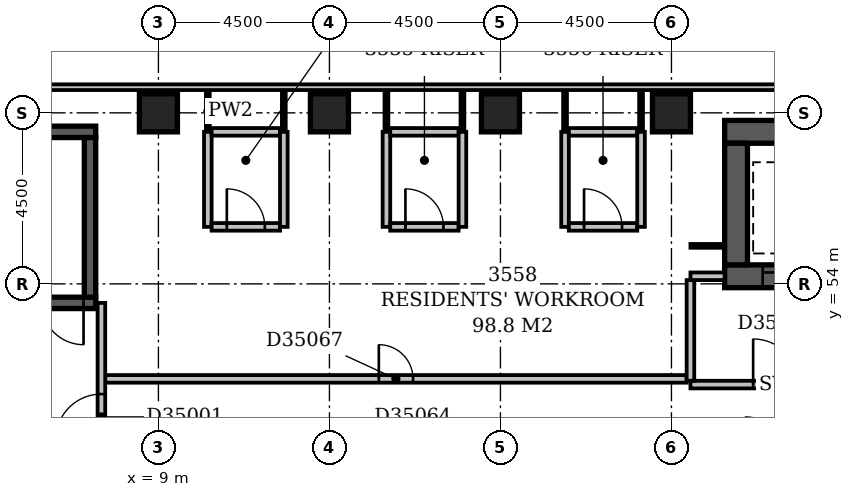
"""IFC4 building model, lengths in metres.
Left out: names, types, materials, properties, quantities, classifications, styles, units other than length and angle.
Written with IfcOpenShell. Run it as: python <this file> out.ifc"""

import sys

from ifc_helpers import new_model, si_unit, direction, frame, frame_2d, origin, origin_2d, place, context, subcontext, project, spatial, rectangle, extrude, element, fill, save


model = new_model("IFC4")
c1 = context("Model", 3, precision=1e-05, world=origin(), true_north=direction((0.0, 1.0)))
c2 = subcontext(c1, "Body", "Model", "MODEL_VIEW")
j1 = project(units=[si_unit("LENGTHUNIT", "METRE"), si_unit("PLANEANGLEUNIT", "RADIAN")], contexts=[c1])
p1 = place(None, origin())
s1 = spatial("IfcSite", under=j1, at=p1, CompositionType="ELEMENT")
p2 = place(p1, origin())
s2 = spatial("IfcBuilding", under=s1, at=p2, CompositionType="ELEMENT")
p3 = place(p2, frame((0.0, 0.0, 141.2)))
s3 = spatial("IfcBuildingStorey", under=s2, at=p3, CompositionType="ELEMENT", Elevation=141.2)
p4 = place(p3, frame((0.35, 53.5, -0.3), z_axis=(0.0, 0.0, 1.0), x_axis=(1.0, 0.0, 0.0)))
e1 = element("IfcWall", 1, at=p4, inside=s3, PredefinedType="SHEAR", context=c2, shape_type="SweptSolid", body=[
    extrude(rectangle(XDim=7.0, YDim=0.3, at=frame_2d((3.5, 0.0))), origin(), (0.0, 0.0, 1.0), 3.6),
])
p5 = place(p4, frame((5.58, 0.0, 0.3)))
e2 = element("IfcOpeningElement", 2, at=p5, cuts=e1, PredefinedType="OPENING", context=c2, shape_type="SweptSolid", body=[
    extrude(rectangle(XDim=1.1, YDim=2.1, at=frame_2d((0.55, 1.05))), frame((0.0, 0.162, 0.0), z_axis=(0.0, -1.0, 0.0), x_axis=(1.0, 0.0, 0.0)), (0.0, 0.0, 1.0), 0.324),
])
p6 = place(p3, frame((0.35, 58.0, -0.3), z_axis=(0.0, 0.0, 1.0), x_axis=(1.0, 0.0, 0.0)))
e3 = element("IfcWall", 3, at=p6, inside=s3, PredefinedType="SHEAR", context=c2, shape_type="SweptSolid", body=[
    extrude(rectangle(XDim=7.0, YDim=0.3, at=frame_2d((3.5, 0.0))), origin(), (0.0, 0.0, 1.0), 3.6),
])
p7 = place(p3, frame((7.2, 53.65, -0.3), z_axis=(0.0, 0.0, 1.0), x_axis=(0.0, 1.0, 0.0)))
e4 = element("IfcWall", 4, at=p7, inside=s3, PredefinedType="SHEAR", context=c2, shape_type="SweptSolid", body=[
    extrude(rectangle(XDim=4.2, YDim=0.3, at=frame_2d((2.1, 0.0))), origin(), (0.0, 0.0, 1.0), 3.6),
])
p8 = place(p3, frame((23.9, 54.2, -0.3), z_axis=(0.0, 0.0, 1.0), x_axis=(1.0, 0.0, 0.0)))
e5 = element("IfcWall", 5, at=p8, inside=s3, PredefinedType="SHEAR", context=c2, shape_type="SweptSolid", body=[
    extrude(rectangle(XDim=3.1, YDim=0.6, at=frame_2d((1.55, 0.0))), origin(), (0.0, 0.0, 1.0), 3.6),
])
p9 = place(p8, frame((1.0, 0.0, 0.3)))
e6 = element("IfcOpeningElement", 6, at=p9, cuts=e5, PredefinedType="OPENING", context=c2, shape_type="SweptSolid", body=[
    extrude(rectangle(XDim=1.1, YDim=2.1, at=frame_2d((0.55, 1.05))), frame((0.0, 0.312, 0.0), z_axis=(0.0, -1.0, 0.0), x_axis=(1.0, 0.0, 0.0)), (0.0, 0.0, 1.0), 0.624),
])
p10 = place(p3, frame((23.9, 58.0, -0.3), z_axis=(0.0, 0.0, 1.0), x_axis=(1.0, 0.0, 0.0)))
e7 = element("IfcWall", 7, at=p10, inside=s3, PredefinedType="SHEAR", context=c2, shape_type="SweptSolid", body=[
    extrude(rectangle(XDim=3.1, YDim=0.6, at=frame_2d((1.55, 0.0))), origin(), (0.0, 0.0, 1.0), 3.6),
])
p11 = place(p3, frame((24.2, 54.5, -0.3), z_axis=(0.0, 0.0, 1.0), x_axis=(0.0, 1.0, 0.0)))
e8 = element("IfcWall", 8, at=p11, inside=s3, PredefinedType="SHEAR", context=c2, shape_type="SweptSolid", body=[
    extrude(rectangle(XDim=3.2, YDim=0.6, at=frame_2d((1.6, 0.0))), origin(), (0.0, 0.0, 1.0), 3.6),
])
for number, where, z_axis, x_axis in (
    (9, (9.0, 58.5, -0.3), (0.0, 0.0, 1.0), (1.0, 0.0, 0.0)),
    (10, (13.5, 58.5, -0.3), (0.0, 0.0, 1.0), (1.0, 0.0, 0.0)),
    (11, (18.0, 58.5, -0.3), (0.0, 0.0, 1.0), (1.0, 0.0, 0.0)),
    (12, (22.5, 58.5, -0.3), (0.0, 0.0, 1.0), (1.0, 0.0, 0.0)),
):
    element("IfcColumn", number, at=place(p3, frame(where, z_axis=z_axis, x_axis=x_axis)), inside=s3, PredefinedType="COLUMN", context=c2, shape_type="SweptSolid", body=[
        extrude(rectangle(XDim=1.0, YDim=1.0, at=origin_2d()), origin(), (0.0, 0.0, 1.0), 3.6),
    ])
p12 = place(p3, frame((68.1, 59.175, 0.0), z_axis=(0.0, 0.0, 1.0), x_axis=(-1.0, 0.0, 0.0)))
e13 = element("IfcWall", 13, at=p12, inside=s3, PredefinedType="STANDARD", context=c2, shape_type="SweptSolid", body=[
    extrude(rectangle(XDim=68.85, YDim=0.15, at=frame_2d((34.425, 0.0))), origin(), (0.0, 0.0, 1.0), 2.7),
])
p13 = place(p12, frame((15.15, 0.0, 0.6)))
e14 = element("IfcOpeningElement", 14, at=p13, cuts=e13, PredefinedType="OPENING", context=c2, shape_type="SweptSolid", body=[
    extrude(rectangle(XDim=2.4, YDim=1.8, at=frame_2d((1.2, 0.9))), frame((0.0, 0.087, 0.0), z_axis=(0.0, -1.0, 0.0), x_axis=(1.0, 0.0, 0.0)), (0.0, 0.0, 1.0), 0.174),
])
p14 = place(p12, frame((19.65, 0.0, 0.6)))
e15 = element("IfcOpeningElement", 15, at=p14, cuts=e13, PredefinedType="OPENING", context=c2, shape_type="SweptSolid", body=[
    extrude(rectangle(XDim=2.4, YDim=1.8, at=frame_2d((1.2, 0.9))), frame((0.0, 0.087, 0.0), z_axis=(0.0, -1.0, 0.0), x_axis=(1.0, 0.0, 0.0)), (0.0, 0.0, 1.0), 0.174),
])
p15 = place(p12, frame((37.65, 0.0, 0.6)))
e16 = element("IfcOpeningElement", 16, at=p15, cuts=e13, PredefinedType="OPENING", context=c2, shape_type="SweptSolid", body=[
    extrude(rectangle(XDim=2.4, YDim=1.8, at=frame_2d((1.2, 0.9))), frame((0.0, 0.087, 0.0), z_axis=(0.0, -1.0, 0.0), x_axis=(1.0, 0.0, 0.0)), (0.0, 0.0, 1.0), 0.174),
])
p16 = place(p3, frame((23.0, 51.35, 0.0), z_axis=(0.0, 0.0, 1.0), x_axis=(1.0, 0.0, 0.0)))
e17 = element("IfcWall", 17, at=p16, inside=s3, PredefinedType="PARTITIONING", context=c2, shape_type="SweptSolid", body=[
    extrude(rectangle(XDim=4.8, YDim=0.2, at=frame_2d((2.4, 0.0))), origin(), (0.0, 0.0, 1.0), 3.3),
])
p17 = place(p16, frame((1.65, 0.0, 0.0)))
e18 = element("IfcOpeningElement", 18, at=p17, cuts=e17, PredefinedType="OPENING", context=c2, shape_type="SweptSolid", body=[
    extrude(rectangle(XDim=1.2, YDim=2.1, at=frame_2d((0.6, 1.05))), frame((0.0, 0.112, 0.0), z_axis=(0.0, -1.0, 0.0), x_axis=(1.0, 0.0, 0.0)), (0.0, 0.0, 1.0), 0.224),
])
p18 = place(p3, frame((23.0, 54.2, 0.0), z_axis=(0.0, 0.0, 1.0), x_axis=(1.0, 0.0, 0.0)))
e19 = element("IfcWall", 19, at=p18, inside=s3, PredefinedType="PARTITIONING", context=c2, shape_type="SweptSolid", body=[
    extrude(rectangle(XDim=0.9, YDim=0.2, at=frame_2d((0.45, 0.0))), origin(), (0.0, 0.0, 1.0), 3.3),
])
p19 = place(p3, frame((23.0, 51.45, 0.0), z_axis=(0.0, 0.0, 1.0), x_axis=(0.0, 1.0, 0.0)))
e20 = element("IfcWall", 20, at=p19, inside=s3, PredefinedType="PARTITIONING", context=c2, shape_type="SweptSolid", body=[
    extrude(rectangle(XDim=2.65, YDim=0.2, at=frame_2d((1.325, 0.0))), origin(), (0.0, 0.0, 1.0), 3.3),
])
p20 = place(p3, frame((7.5, 49.6, 0.0), z_axis=(0.0, 0.0, 1.0), x_axis=(0.0, 1.0, 0.0)))
e21 = element("IfcWall", 21, at=p20, inside=s3, PredefinedType="PARTITIONING", context=c2, shape_type="SweptSolid", body=[
    extrude(rectangle(XDim=3.9, YDim=0.2, at=frame_2d((1.95, 0.0))), origin(), (0.0, 0.0, 1.0), 3.3),
])
p21 = place(p20, frame((0.3, 0.0, 0.0)))
e22 = element("IfcOpeningElement", 22, at=p21, cuts=e21, PredefinedType="OPENING", context=c2, shape_type="SweptSolid", body=[
    extrude(rectangle(XDim=1.2, YDim=2.1, at=frame_2d((0.6, 1.05))), frame((0.0, 0.112, 0.0), z_axis=(0.0, -1.0, 0.0), x_axis=(1.0, 0.0, 0.0)), (0.0, 0.0, 1.0), 0.224),
])
p22 = place(p3, frame((7.6, 51.5, 0.0), z_axis=(0.0, 0.0, 1.0), x_axis=(1.0, 0.0, 0.0)))
e23 = element("IfcWall", 23, at=p22, inside=s3, PredefinedType="PARTITIONING", context=c2, shape_type="SweptSolid", body=[
    extrude(rectangle(XDim=15.3, YDim=0.2, at=frame_2d((7.65, 0.0))), origin(), (0.0, 0.0, 1.0), 3.3),
])
p23 = place(p22, frame((7.2, 0.0, 0.0)))
e24 = element("IfcOpeningElement", 24, at=p23, cuts=e23, PredefinedType="OPENING", context=c2, shape_type="SweptSolid", body=[
    extrude(rectangle(XDim=0.9, YDim=2.1, at=frame_2d((0.45, 1.05))), frame((0.0, 0.112, 0.0), z_axis=(0.0, -1.0, 0.0), x_axis=(1.0, 0.0, 0.0)), (0.0, 0.0, 1.0), 0.224),
])
p24 = place(p3, frame((23.0, 55.0, 0.0), z_axis=(0.0, 0.0, 1.0), x_axis=(1.0, 0.0, 0.0)))
e25 = element("IfcWall", 25, at=p24, inside=s3, PredefinedType="PARTITIONING", context=c2, shape_type="SweptSolid", body=[
    extrude(rectangle(XDim=0.9, YDim=0.1, at=frame_2d((0.45, 0.0))), origin(), (0.0, 0.0, 1.0), 3.3),
])
p25 = place(p3, frame((10.3, 55.5, 0.0), z_axis=(0.0, 0.0, 1.0), x_axis=(0.0, 1.0, 0.0)))
e26 = element("IfcWall", 26, at=p25, inside=s3, PredefinedType="PARTITIONING", context=c2, shape_type="SweptSolid", body=[
    extrude(rectangle(XDim=2.5, YDim=0.2, at=frame_2d((1.25, 0.0))), origin(), (0.0, 0.0, 1.0), 3.3),
])
p26 = place(p3, frame((10.4, 55.5, 0.0), z_axis=(0.0, 0.0, 1.0), x_axis=(1.0, 0.0, 0.0)))
e27 = element("IfcWall", 27, at=p26, inside=s3, PredefinedType="PARTITIONING", context=c2, shape_type="SweptSolid", body=[
    extrude(rectangle(XDim=1.8, YDim=0.2, at=frame_2d((0.9, 0.0))), origin(), (0.0, 0.0, 1.0), 3.3),
])
p27 = place(p26, frame((0.4, 0.0, 0.0)))
e28 = element("IfcOpeningElement", 28, at=p27, cuts=e27, PredefinedType="OPENING", context=c2, shape_type="SweptSolid", body=[
    extrude(rectangle(XDim=1.0, YDim=2.1, at=frame_2d((0.5, 1.05))), frame((0.0, 0.112, 0.0), z_axis=(0.0, -1.0, 0.0), x_axis=(1.0, 0.0, 0.0)), (0.0, 0.0, 1.0), 0.224),
])
for number, where, z_axis, x_axis in (
    (29, (12.3, 55.5, 0.0), (0.0, 0.0, 1.0), (0.0, 1.0, 0.0)),
    (30, (15.0, 55.5, 0.0), (0.0, 0.0, 1.0), (0.0, 1.0, 0.0)),
):
    element("IfcWall", number, at=place(p3, frame(where, z_axis=z_axis, x_axis=x_axis)), inside=s3, PredefinedType="PARTITIONING", context=c2, shape_type="SweptSolid", body=[
        extrude(rectangle(XDim=2.5, YDim=0.2, at=frame_2d((1.25, 0.0))), origin(), (0.0, 0.0, 1.0), 3.3),
    ])
p28 = place(p3, frame((15.1, 55.5, 0.0), z_axis=(0.0, 0.0, 1.0), x_axis=(1.0, 0.0, 0.0)))
e31 = element("IfcWall", 31, at=p28, inside=s3, PredefinedType="PARTITIONING", context=c2, shape_type="SweptSolid", body=[
    extrude(rectangle(XDim=1.8, YDim=0.2, at=frame_2d((0.9, 0.0))), origin(), (0.0, 0.0, 1.0), 3.3),
])
p29 = place(p28, frame((0.4, 0.0, 0.0)))
e32 = element("IfcOpeningElement", 32, at=p29, cuts=e31, PredefinedType="OPENING", context=c2, shape_type="SweptSolid", body=[
    extrude(rectangle(XDim=1.0, YDim=2.1, at=frame_2d((0.5, 1.05))), frame((0.0, 0.112, 0.0), z_axis=(0.0, -1.0, 0.0), x_axis=(1.0, 0.0, 0.0)), (0.0, 0.0, 1.0), 0.224),
])
for number, where, z_axis, x_axis in (
    (33, (17.0, 55.5, 0.0), (0.0, 0.0, 1.0), (0.0, 1.0, 0.0)),
    (34, (19.7, 55.5, 0.0), (0.0, 0.0, 1.0), (0.0, 1.0, 0.0)),
):
    element("IfcWall", number, at=place(p3, frame(where, z_axis=z_axis, x_axis=x_axis)), inside=s3, PredefinedType="PARTITIONING", context=c2, shape_type="SweptSolid", body=[
        extrude(rectangle(XDim=2.5, YDim=0.2, at=frame_2d((1.25, 0.0))), origin(), (0.0, 0.0, 1.0), 3.3),
    ])
p30 = place(p3, frame((19.8, 55.5, 0.0), z_axis=(0.0, 0.0, 1.0), x_axis=(1.0, 0.0, 0.0)))
e35 = element("IfcWall", 35, at=p30, inside=s3, PredefinedType="PARTITIONING", context=c2, shape_type="SweptSolid", body=[
    extrude(rectangle(XDim=1.8, YDim=0.2, at=frame_2d((0.9, 0.0))), origin(), (0.0, 0.0, 1.0), 3.3),
])
p31 = place(p30, frame((0.4, 0.0, 0.0)))
e36 = element("IfcOpeningElement", 36, at=p31, cuts=e35, PredefinedType="OPENING", context=c2, shape_type="SweptSolid", body=[
    extrude(rectangle(XDim=1.0, YDim=2.1, at=frame_2d((0.5, 1.05))), frame((0.0, 0.112, 0.0), z_axis=(0.0, -1.0, 0.0), x_axis=(1.0, 0.0, 0.0)), (0.0, 0.0, 1.0), 0.224),
])
p32 = place(p3, frame((21.7, 55.5, 0.0), z_axis=(0.0, 0.0, 1.0), x_axis=(0.0, 1.0, 0.0)))
e37 = element("IfcWall", 37, at=p32, inside=s3, PredefinedType="PARTITIONING", context=c2, shape_type="SweptSolid", body=[
    extrude(rectangle(XDim=2.5, YDim=0.2, at=frame_2d((1.25, 0.0))), origin(), (0.0, 0.0, 1.0), 3.3),
])
p33 = place(p3, frame((10.3, 58.0, 0.0), z_axis=(0.0, 0.0, 1.0), x_axis=(0.0, 1.0, 0.0)))
e38 = element("IfcWall", 38, at=p33, inside=s3, PredefinedType="PARTITIONING", context=c2, shape_type="SweptSolid", body=[
    extrude(rectangle(XDim=1.1, YDim=0.1, at=frame_2d((0.55, 0.0))), origin(), (0.0, 0.0, 1.0), 3.3),
])
p34 = place(p3, frame((10.4, 58.0, 0.0), z_axis=(0.0, 0.0, 1.0), x_axis=(1.0, 0.0, 0.0)))
e39 = element("IfcWall", 39, at=p34, inside=s3, PredefinedType="PARTITIONING", context=c2, shape_type="SweptSolid", body=[
    extrude(rectangle(XDim=1.8, YDim=0.2, at=frame_2d((0.9, 0.0))), origin(), (0.0, 0.0, 1.0), 3.3),
])
for number, where, z_axis, x_axis in (
    (40, (12.3, 58.0, 0.0), (0.0, 0.0, 1.0), (0.0, 1.0, 0.0)),
    (41, (15.0, 58.0, 0.0), (0.0, 0.0, 1.0), (0.0, 1.0, 0.0)),
):
    element("IfcWall", number, at=place(p3, frame(where, z_axis=z_axis, x_axis=x_axis)), inside=s3, PredefinedType="PARTITIONING", context=c2, shape_type="SweptSolid", body=[
        extrude(rectangle(XDim=1.1, YDim=0.1, at=frame_2d((0.55, 0.0))), origin(), (0.0, 0.0, 1.0), 3.3),
    ])
p35 = place(p3, frame((15.1, 58.0, 0.0), z_axis=(0.0, 0.0, 1.0), x_axis=(1.0, 0.0, 0.0)))
e42 = element("IfcWall", 42, at=p35, inside=s3, PredefinedType="PARTITIONING", context=c2, shape_type="SweptSolid", body=[
    extrude(rectangle(XDim=1.8, YDim=0.2, at=frame_2d((0.9, 0.0))), origin(), (0.0, 0.0, 1.0), 3.3),
])
for number, where, z_axis, x_axis in (
    (43, (17.0, 58.0, 0.0), (0.0, 0.0, 1.0), (0.0, 1.0, 0.0)),
    (44, (19.7, 58.0, 0.0), (0.0, 0.0, 1.0), (0.0, 1.0, 0.0)),
):
    element("IfcWall", number, at=place(p3, frame(where, z_axis=z_axis, x_axis=x_axis)), inside=s3, PredefinedType="PARTITIONING", context=c2, shape_type="SweptSolid", body=[
        extrude(rectangle(XDim=1.1, YDim=0.1, at=frame_2d((0.55, 0.0))), origin(), (0.0, 0.0, 1.0), 3.3),
    ])
p36 = place(p3, frame((19.8, 58.0, 0.0), z_axis=(0.0, 0.0, 1.0), x_axis=(1.0, 0.0, 0.0)))
e45 = element("IfcWall", 45, at=p36, inside=s3, PredefinedType="PARTITIONING", context=c2, shape_type="SweptSolid", body=[
    extrude(rectangle(XDim=1.8, YDim=0.2, at=frame_2d((0.9, 0.0))), origin(), (0.0, 0.0, 1.0), 3.3),
])
p37 = place(p3, frame((21.7, 58.0, 0.0), z_axis=(0.0, 0.0, 1.0), x_axis=(0.0, 1.0, 0.0)))
e46 = element("IfcWall", 46, at=p37, inside=s3, PredefinedType="PARTITIONING", context=c2, shape_type="SweptSolid", body=[
    extrude(rectangle(XDim=1.1, YDim=0.1, at=frame_2d((0.55, 0.0))), origin(), (0.0, 0.0, 1.0), 3.3),
])
p38 = place(p21, origin())
e47 = element("IfcDoor", 47, at=p38, inside=s3, OperationType="SINGLE_SWING_LEFT", PredefinedType="DOOR", context=c2, shape_type="SweptSolid", body=[
    extrude(rectangle(XDim=1.2, YDim=2.1, at=frame_2d((0.6, 1.05))), frame((0.0, 0.025, 0.0), z_axis=(0.0, -1.0, 0.0), x_axis=(1.0, 0.0, 0.0)), (0.0, 0.0, 1.0), 0.05),
])
fill(e22, e47)
p39 = place(p17, origin())
e48 = element("IfcDoor", 48, at=p39, inside=s3, OperationType="SINGLE_SWING_LEFT", PredefinedType="DOOR", context=c2, shape_type="SweptSolid", body=[
    extrude(rectangle(XDim=1.2, YDim=2.1, at=frame_2d((0.6, 1.05))), frame((0.0, 0.025, 0.0), z_axis=(0.0, -1.0, 0.0), x_axis=(1.0, 0.0, 0.0)), (0.0, 0.0, 1.0), 0.05),
])
fill(e18, e48)
p40 = place(p9, origin())
e49 = element("IfcDoor", 49, at=p40, inside=s3, OperationType="SLIDING_TO_LEFT", PredefinedType="DOOR", context=c2, shape_type="SweptSolid", body=[
    extrude(rectangle(XDim=1.1, YDim=2.1, at=frame_2d((0.55, 1.05))), frame((0.0, 0.025, 0.0), z_axis=(0.0, -1.0, 0.0), x_axis=(1.0, 0.0, 0.0)), (0.0, 0.0, 1.0), 0.05),
])
fill(e6, e49)
p41 = place(p5, origin())
e50 = element("IfcDoor", 50, at=p41, inside=s3, OperationType="SINGLE_SWING_RIGHT", PredefinedType="DOOR", context=c2, shape_type="SweptSolid", body=[
    extrude(rectangle(XDim=1.1, YDim=2.1, at=frame_2d((0.55, 1.05))), frame((0.0, 0.025, 0.0), z_axis=(0.0, -1.0, 0.0), x_axis=(1.0, 0.0, 0.0)), (0.0, 0.0, 1.0), 0.05),
])
fill(e2, e50)
p42 = place(p23, origin())
e51 = element("IfcDoor", 51, at=p42, inside=s3, OperationType="SINGLE_SWING_LEFT", PredefinedType="DOOR", context=c2, shape_type="SweptSolid", body=[
    extrude(rectangle(XDim=0.9, YDim=2.1, at=frame_2d((0.45, 1.05))), frame((0.0, 0.025, 0.0), z_axis=(0.0, -1.0, 0.0), x_axis=(1.0, 0.0, 0.0)), (0.0, 0.0, 1.0), 0.05),
])
fill(e24, e51)
p43 = place(p27, origin())
e52 = element("IfcDoor", 52, at=p43, inside=s3, OperationType="SINGLE_SWING_LEFT", PredefinedType="DOOR", context=c2, shape_type="SweptSolid", body=[
    extrude(rectangle(XDim=1.0, YDim=2.1, at=frame_2d((0.5, 1.05))), frame((0.0, 0.025, 0.0), z_axis=(0.0, -1.0, 0.0), x_axis=(1.0, 0.0, 0.0)), (0.0, 0.0, 1.0), 0.05),
])
fill(e28, e52)
p44 = place(p29, origin())
e53 = element("IfcDoor", 53, at=p44, inside=s3, OperationType="SINGLE_SWING_LEFT", PredefinedType="DOOR", context=c2, shape_type="SweptSolid", body=[
    extrude(rectangle(XDim=1.0, YDim=2.1, at=frame_2d((0.5, 1.05))), frame((0.0, 0.025, 0.0), z_axis=(0.0, -1.0, 0.0), x_axis=(1.0, 0.0, 0.0)), (0.0, 0.0, 1.0), 0.05),
])
fill(e32, e53)
p45 = place(p31, origin())
e54 = element("IfcDoor", 54, at=p45, inside=s3, OperationType="SINGLE_SWING_LEFT", PredefinedType="DOOR", context=c2, shape_type="SweptSolid", body=[
    extrude(rectangle(XDim=1.0, YDim=2.1, at=frame_2d((0.5, 1.05))), frame((0.0, 0.025, 0.0), z_axis=(0.0, -1.0, 0.0), x_axis=(1.0, 0.0, 0.0)), (0.0, 0.0, 1.0), 0.05),
])
fill(e36, e54)
save(model, sys.argv[1])
